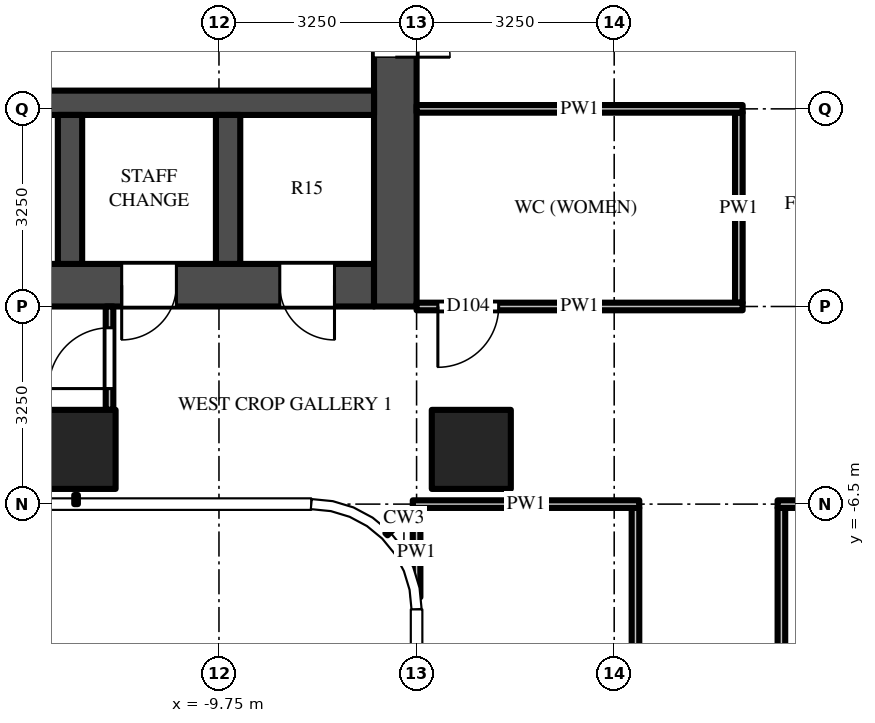
"""IFC4 building model, lengths in metres.
Left out: names, types, materials, properties, quantities, classifications, styles, units other than length and angle.
Written with IfcOpenShell. Run it as: python <this file> out.ifc"""

import sys

from ifc_helpers import new_model, si_unit, direction, frame, frame_2d, origin, origin_2d, place, context, subcontext, project, spatial, rectangle, extrude, source, transform, mapped, element, fill, save


model = new_model("IFC4")
c1 = context("Model", 3, precision=1e-05, world=origin(), true_north=direction((0.0, 1.0)))
c2 = subcontext(c1, "Body", "Model", "MODEL_VIEW")
j1 = project(units=[si_unit("LENGTHUNIT", "METRE"), si_unit("PLANEANGLEUNIT", "RADIAN")], contexts=[c1])
p1 = place(None, origin())
s1 = spatial("IfcSite", under=j1, at=p1, CompositionType="ELEMENT")
p2 = place(p1, origin())
s2 = spatial("IfcBuilding", under=s1, at=p2, CompositionType="ELEMENT")
p3 = place(p2, frame((0.0, 0.0, 106.5)))
s3 = spatial("IfcBuildingStorey", under=s2, at=p3, CompositionType="ELEMENT", Elevation=106.5)
m1 = source(origin(), c2, "Body", "SweptSolid", [
    extrude(rectangle(XDim=1.3, YDim=1.3, at=origin_2d()), origin(), (0.0, 0.0, 1.0), 4.5),
])
for number, where, z_axis, x_axis in (
    (1, (-5.6, -5.6, 0.0), (0.0, 0.0, 1.0), (1.0, 0.0, 0.0)),
    (2, (-12.1, -5.6, 0.0), (0.0, 0.0, 1.0), (1.0, 0.0, 0.0)),
):
    element("IfcColumn", number, at=place(p3, frame(where, z_axis=z_axis, x_axis=x_axis)), inside=s3, PredefinedType="COLUMN", context=c2, shape_type="MappedRepresentation", body=[
        mapped(m1, transform((0.0, 0.0, 0.0))),
    ])
m2 = source(origin(), c2, "Body", "SweptSolid", [
    extrude(rectangle(XDim=14.85, YDim=0.7, at=frame_2d((7.425, 0.0))), origin(), (0.0, 0.0, 1.0), 4.25),
])
p4 = place(p3, frame((-7.2, -2.9, 0.0), z_axis=(0.0, 0.0, 1.0), x_axis=(-1.0, 0.0, 0.0)))
e3 = element("IfcWall", 3, at=p4, inside=s3, PredefinedType="SHEAR", context=c2, shape_type="MappedRepresentation", body=[
    mapped(m2, transform((0.0, 0.0, 0.0))),
])
m3 = source(origin(), c2, "Body", "SweptSolid", [
    extrude(rectangle(XDim=1.3, YDim=2.1, at=frame_2d((0.65, 1.05))), frame((0.0, 0.36, 0.0), z_axis=(0.0, -1.0, 0.0), x_axis=(1.0, 0.0, 0.0)), (0.0, 0.0, 1.0), 0.72),
])
p5 = place(p4, frame((12.2, 0.0, 0.0)))
e4 = element("IfcOpeningElement", 4, at=p5, cuts=e3, PredefinedType="OPENING", context=c2, shape_type="MappedRepresentation", body=[
    mapped(m3, transform((0.0, 0.0, 0.0))),
])
m4 = source(origin(), c2, "Body", "SweptSolid", [
    extrude(rectangle(XDim=1.2, YDim=2.1, at=frame_2d((0.6, 1.05))), frame((0.0, 0.36, 0.0), z_axis=(0.0, -1.0, 0.0), x_axis=(1.0, 0.0, 0.0)), (0.0, 0.0, 1.0), 0.72),
])
p6 = place(p4, frame((9.85, 0.0, 0.0)))
e5 = element("IfcOpeningElement", 5, at=p6, cuts=e3, PredefinedType="OPENING", context=c2, shape_type="MappedRepresentation", body=[
    mapped(m4, transform((0.0, 0.0, 0.0))),
])
m5 = source(origin(), c2, "Body", "SweptSolid", [
    extrude(rectangle(XDim=1.0, YDim=2.1, at=frame_2d((0.5, 1.05))), frame((0.0, 0.36, 0.0), z_axis=(0.0, -1.0, 0.0), x_axis=(1.0, 0.0, 0.0)), (0.0, 0.0, 1.0), 0.72),
])
p7 = place(p4, frame((7.9, 0.0, 0.0)))
e6 = element("IfcOpeningElement", 6, at=p7, cuts=e3, PredefinedType="OPENING", context=c2, shape_type="MappedRepresentation", body=[
    mapped(m5, transform((0.0, 0.0, 0.0))),
])
m6 = source(origin(), c2, "Body", "SweptSolid", [
    extrude(rectangle(XDim=0.9, YDim=2.1, at=frame_2d((0.45, 1.05))), frame((0.0, 0.36, 0.0), z_axis=(0.0, -1.0, 0.0), x_axis=(1.0, 0.0, 0.0)), (0.0, 0.0, 1.0), 0.72),
])
p8 = place(p4, frame((0.65, 0.0, 0.0)))
e7 = element("IfcOpeningElement", 7, at=p8, cuts=e3, PredefinedType="OPENING", context=c2, shape_type="MappedRepresentation", body=[
    mapped(m6, transform((0.0, 0.0, 0.0))),
])
p9 = place(p4, frame((3.25, 0.0, 0.0)))
e8 = element("IfcOpeningElement", 8, at=p9, cuts=e3, PredefinedType="OPENING", context=c2, shape_type="MappedRepresentation", body=[
    mapped(m6, transform((0.0, 0.0, 0.0))),
])
p10 = place(p4, frame((5.8, 0.0, 0.0)))
e9 = element("IfcOpeningElement", 9, at=p10, cuts=e3, PredefinedType="OPENING", context=c2, shape_type="MappedRepresentation", body=[
    mapped(m5, transform((0.0, 0.0, 0.0))),
])
m7 = source(origin(), c2, "Body", "SweptSolid", [
    extrude(rectangle(XDim=9.05, YDim=0.7, at=frame_2d((4.525, 0.0))), origin(), (0.0, 0.0, 1.0), 4.25),
])
p11 = place(p3, frame((-6.85, 5.8, 0.0), z_axis=(0.0, 0.0, 1.0), x_axis=(0.0, -1.0, 0.0)))
e10 = element("IfcWall", 10, at=p11, inside=s3, PredefinedType="SHEAR", context=c2, shape_type="MappedRepresentation", body=[
    mapped(m7, transform((0.0, 0.0, 0.0))),
])
m8 = source(origin(), c2, "Body", "SweptSolid", [
    extrude(rectangle(XDim=1.8, YDim=2.1, at=frame_2d((0.9, 1.05))), frame((0.0, 0.36, 0.0), z_axis=(0.0, -1.0, 0.0), x_axis=(1.0, 0.0, 0.0)), (0.0, 0.0, 1.0), 0.72),
])
p12 = place(p11, frame((3.15, 0.0, 0.0)))
e11 = element("IfcOpeningElement", 11, at=p12, cuts=e10, PredefinedType="OPENING", context=c2, shape_type="MappedRepresentation", body=[
    mapped(m8, transform((0.0, 0.0, 0.0))),
])
m9 = source(origin(), c2, "Body", "SweptSolid", [
    extrude(rectangle(XDim=14.85, YDim=0.4, at=frame_2d((7.425, 0.0))), origin(), (0.0, 0.0, 1.0), 4.25),
])
p13 = place(p3, frame((-7.2, 0.1, 0.0), z_axis=(0.0, 0.0, 1.0), x_axis=(-1.0, 0.0, 0.0)))
e12 = element("IfcWall", 12, at=p13, inside=s3, PredefinedType="SHEAR", context=c2, shape_type="MappedRepresentation", body=[
    mapped(m9, transform((0.0, 0.0, 0.0))),
])
m10 = source(origin(), c2, "Body", "SweptSolid", [
    extrude(rectangle(XDim=1.0, YDim=2.1, at=frame_2d((0.5, 1.05))), frame((0.0, 0.21, 0.0), z_axis=(0.0, -1.0, 0.0), x_axis=(1.0, 0.0, 0.0)), (0.0, 0.0, 1.0), 0.42),
])
p14 = place(p13, frame((7.9, 0.0, 0.0)))
e13 = element("IfcOpeningElement", 13, at=p14, cuts=e12, PredefinedType="OPENING", context=c2, shape_type="MappedRepresentation", body=[
    mapped(m10, transform((0.0, 0.0, 0.0))),
])
m11 = source(origin(), c2, "Body", "SweptSolid", [
    extrude(rectangle(XDim=2.45, YDim=0.4, at=frame_2d((1.225, 0.0))), origin(), (0.0, 0.0, 1.0), 4.25),
])
for number, where, z_axis, x_axis in (
    (14, (-9.6, -0.1, 0.0), (0.0, 0.0, 1.0), (0.0, -1.0, 0.0)),
    (15, (-12.2, -0.1, 0.0), (0.0, 0.0, 1.0), (0.0, -1.0, 0.0)),
):
    element("IfcWall", number, at=place(p3, frame(where, z_axis=z_axis, x_axis=x_axis)), inside=s3, PredefinedType="SHEAR", context=c2, shape_type="MappedRepresentation", body=[
        mapped(m11, transform((0.0, 0.0, 0.0))),
    ])
m12 = source(origin(), c2, "Body", "SweptSolid", [
    extrude(rectangle(XDim=1.7, YDim=0.125, at=frame_2d((0.85, 0.0))), origin(), (0.0, 0.0, 1.0), 4.25),
])
p15 = place(p3, frame((-11.55, -4.95, 0.0), z_axis=(0.0, 0.0, 1.0), x_axis=(0.0, 1.0, 0.0)))
e16 = element("IfcWall", 16, at=p15, inside=s3, PredefinedType="PARTITIONING", context=c2, shape_type="MappedRepresentation", body=[
    mapped(m12, transform((0.0, 0.0, 0.0))),
])
m13 = source(origin(), c2, "Body", "SweptSolid", [
    extrude(rectangle(XDim=1.0, YDim=2.1, at=frame_2d((0.5, 1.05))), frame((0.0, 0.073, 0.0), z_axis=(0.0, -1.0, 0.0), x_axis=(1.0, 0.0, 0.0)), (0.0, 0.0, 1.0), 0.145),
])
p16 = place(p15, frame((0.35, 0.0, 0.0)))
e17 = element("IfcOpeningElement", 17, at=p16, cuts=e16, PredefinedType="OPENING", context=c2, shape_type="MappedRepresentation", body=[
    mapped(m13, transform((0.0, 0.0, 0.0))),
])
m14 = source(origin(), c2, "Body", "SweptSolid", [
    extrude(rectangle(XDim=1.469, YDim=0.125, at=frame_2d((0.734, 0.0))), origin(), (0.0, 0.0, 1.0), 4.25),
])
p17 = place(p3, frame((-6.5, -6.562, 0.0), z_axis=(0.0, 0.0, 1.0), x_axis=(0.0, -1.0, 0.0)))
e18 = element("IfcWall", 18, at=p17, inside=s3, PredefinedType="PARTITIONING", context=c2, shape_type="MappedRepresentation", body=[
    mapped(m14, transform((0.0, 0.0, 0.0))),
])
m15 = source(origin(), c2, "Body", "SweptSolid", [
    extrude(rectangle(XDim=5.538, YDim=0.125, at=frame_2d((2.769, 0.0))), origin(), (0.0, 0.0, 1.0), 3.468),
])
p18 = place(p3, frame((-2.9, -12.1, 0.0), z_axis=(0.0, 0.0, 1.0), x_axis=(0.0, 1.0, 0.0)))
e19 = element("IfcWall", 19, at=p18, inside=s3, PredefinedType="PARTITIONING", context=c2, shape_type="MappedRepresentation", body=[
    mapped(m15, transform((0.0, 0.0, 0.0))),
])
p19 = place(p18, frame((0.35, 0.0, 0.0)))
e20 = element("IfcOpeningElement", 20, at=p19, cuts=e19, PredefinedType="OPENING", context=c2, shape_type="MappedRepresentation", body=[
    mapped(m13, transform((0.0, 0.0, 0.0))),
])
m16 = source(origin(), c2, "Body", "SweptSolid", [
    extrude(rectangle(XDim=3.125, YDim=0.125, at=frame_2d((1.562, 0.0))), origin(), (0.0, 0.0, 1.0), 3.546),
])
p20 = place(p3, frame((-1.2, -0.062, 0.0), z_axis=(0.0, 0.0, 1.0), x_axis=(0.0, -1.0, 0.0)))
e21 = element("IfcWall", 21, at=p20, inside=s3, PredefinedType="PARTITIONING", context=c2, shape_type="MappedRepresentation", body=[
    mapped(m16, transform((0.0, 0.0, 0.0))),
])
m17 = source(origin(), c2, "Body", "SweptSolid", [
    extrude(rectangle(XDim=5.475, YDim=0.125, at=frame_2d((2.738, 0.0))), origin(), (0.0, 0.0, 1.0), 3.468),
])
p21 = place(p3, frame((-0.5, -12.038, 0.0), z_axis=(0.0, 0.0, 1.0), x_axis=(0.0, 1.0, 0.0)))
e22 = element("IfcWall", 22, at=p21, inside=s3, PredefinedType="PARTITIONING", context=c2, shape_type="MappedRepresentation", body=[
    mapped(m17, transform((0.0, 0.0, 0.0))),
])
p22 = place(p21, frame((0.288, 0.0, 0.0)))
e23 = element("IfcOpeningElement", 23, at=p22, cuts=e22, PredefinedType="OPENING", context=c2, shape_type="MappedRepresentation", body=[
    mapped(m13, transform((0.0, 0.0, 0.0))),
])
m18 = source(origin(), c2, "Body", "SweptSolid", [
    extrude(rectangle(XDim=3.725, YDim=0.125, at=frame_2d((1.863, 0.0))), origin(), (0.0, 0.0, 1.0), 3.33),
])
p23 = place(p3, frame((-2.837, -6.5, 0.0), z_axis=(0.0, 0.0, 1.0), x_axis=(-1.0, 0.0, 0.0)))
e24 = element("IfcWall", 24, at=p23, inside=s3, PredefinedType="PARTITIONING", context=c2, shape_type="MappedRepresentation", body=[
    mapped(m18, transform((0.0, 0.0, 0.0))),
])
m19 = source(origin(), c2, "Body", "SweptSolid", [
    extrude(rectangle(XDim=1.825, YDim=0.125, at=frame_2d((0.913, 0.0))), origin(), (0.0, 0.0, 1.0), 4.25),
])
p24 = place(p3, frame((1.262, -6.5, 0.0), z_axis=(0.0, 0.0, 1.0), x_axis=(-1.0, 0.0, 0.0)))
e25 = element("IfcWall", 25, at=p24, inside=s3, PredefinedType="PARTITIONING", context=c2, shape_type="MappedRepresentation", body=[
    mapped(m19, transform((0.0, 0.0, 0.0))),
])
m20 = source(origin(), c2, "Body", "SweptSolid", [
    extrude(rectangle(XDim=5.363, YDim=0.125, at=frame_2d((2.681, 0.0))), origin(), (0.0, 0.0, 1.0), 3.468),
])
p25 = place(p3, frame((-1.137, -3.25, 0.0), z_axis=(0.0, 0.0, 1.0), x_axis=(-1.0, 0.0, 0.0)))
e26 = element("IfcWall", 26, at=p25, inside=s3, PredefinedType="PARTITIONING", context=c2, shape_type="MappedRepresentation", body=[
    mapped(m20, transform((0.0, 0.0, 0.0))),
])
p26 = place(p25, frame((4.012, 0.0, 0.0)))
e27 = element("IfcOpeningElement", 27, at=p26, cuts=e26, PredefinedType="OPENING", context=c2, shape_type="MappedRepresentation", body=[
    mapped(m13, transform((0.0, 0.0, 0.0))),
])
p27 = place(p3, frame((-1.137, 0.0, 0.0), z_axis=(0.0, 0.0, 1.0), x_axis=(-1.0, 0.0, 0.0)))
e28 = element("IfcWall", 28, at=p27, inside=s3, PredefinedType="PARTITIONING", context=c2, shape_type="MappedRepresentation", body=[
    mapped(m20, transform((0.0, 0.0, 0.0))),
])
m21 = source(origin(), c2, "Body", "SweptSolid", [
    extrude(rectangle(XDim=1.8, YDim=2.1, at=frame_2d((0.9, 1.05))), frame((0.0, -0.275, 0.0), z_axis=(0.0, -1.0, 0.0), x_axis=(1.0, 0.0, 0.0)), (0.0, 0.0, 1.0), 0.05),
])
p28 = place(p12, origin())
e29 = element("IfcDoor", 29, at=p28, inside=s3, OperationType="DOUBLE_DOOR_SINGLE_SWING", PredefinedType="DOOR", context=c2, shape_type="MappedRepresentation", body=[
    mapped(m21, transform((0.0, 0.0, 0.0))),
])
fill(e11, e29)
m22 = source(origin(), c2, "Body", "SweptSolid", [
    extrude(rectangle(XDim=0.9, YDim=2.1, at=frame_2d((0.45, 1.05))), frame((0.0, -0.275, 0.0), z_axis=(0.0, -1.0, 0.0), x_axis=(1.0, 0.0, 0.0)), (0.0, 0.0, 1.0), 0.05),
])
p29 = place(p8, origin())
e30 = element("IfcDoor", 30, at=p29, inside=s3, OperationType="SINGLE_SWING_LEFT", PredefinedType="DOOR", context=c2, shape_type="MappedRepresentation", body=[
    mapped(m22, transform((0.0, 0.0, 0.0))),
])
fill(e7, e30)
p30 = place(p9, origin())
e31 = element("IfcDoor", 31, at=p30, inside=s3, OperationType="SINGLE_SWING_RIGHT", PredefinedType="DOOR", context=c2, shape_type="MappedRepresentation", body=[
    mapped(m22, transform((0.0, 0.0, 0.0))),
])
fill(e8, e31)
m23 = source(origin(), c2, "Body", "SweptSolid", [
    extrude(rectangle(XDim=1.0, YDim=2.1, at=frame_2d((0.5, 1.05))), frame((0.0, 0.025, 0.0), z_axis=(0.0, -1.0, 0.0), x_axis=(1.0, 0.0, 0.0)), (0.0, 0.0, 1.0), 0.05),
])
p31 = place(p16, origin())
e32 = element("IfcDoor", 32, at=p31, inside=s3, OperationType="SINGLE_SWING_LEFT", PredefinedType="DOOR", context=c2, shape_type="MappedRepresentation", body=[
    mapped(m23, transform((0.0, 0.0, 0.0))),
])
fill(e17, e32)
p32 = place(p26, origin())
e33 = element("IfcDoor", 33, at=p32, inside=s3, OperationType="SINGLE_SWING_RIGHT", PredefinedType="DOOR", context=c2, shape_type="MappedRepresentation", body=[
    mapped(m23, transform((0.0, 0.0, 0.0))),
])
fill(e27, e33)
save(model, sys.argv[1])
